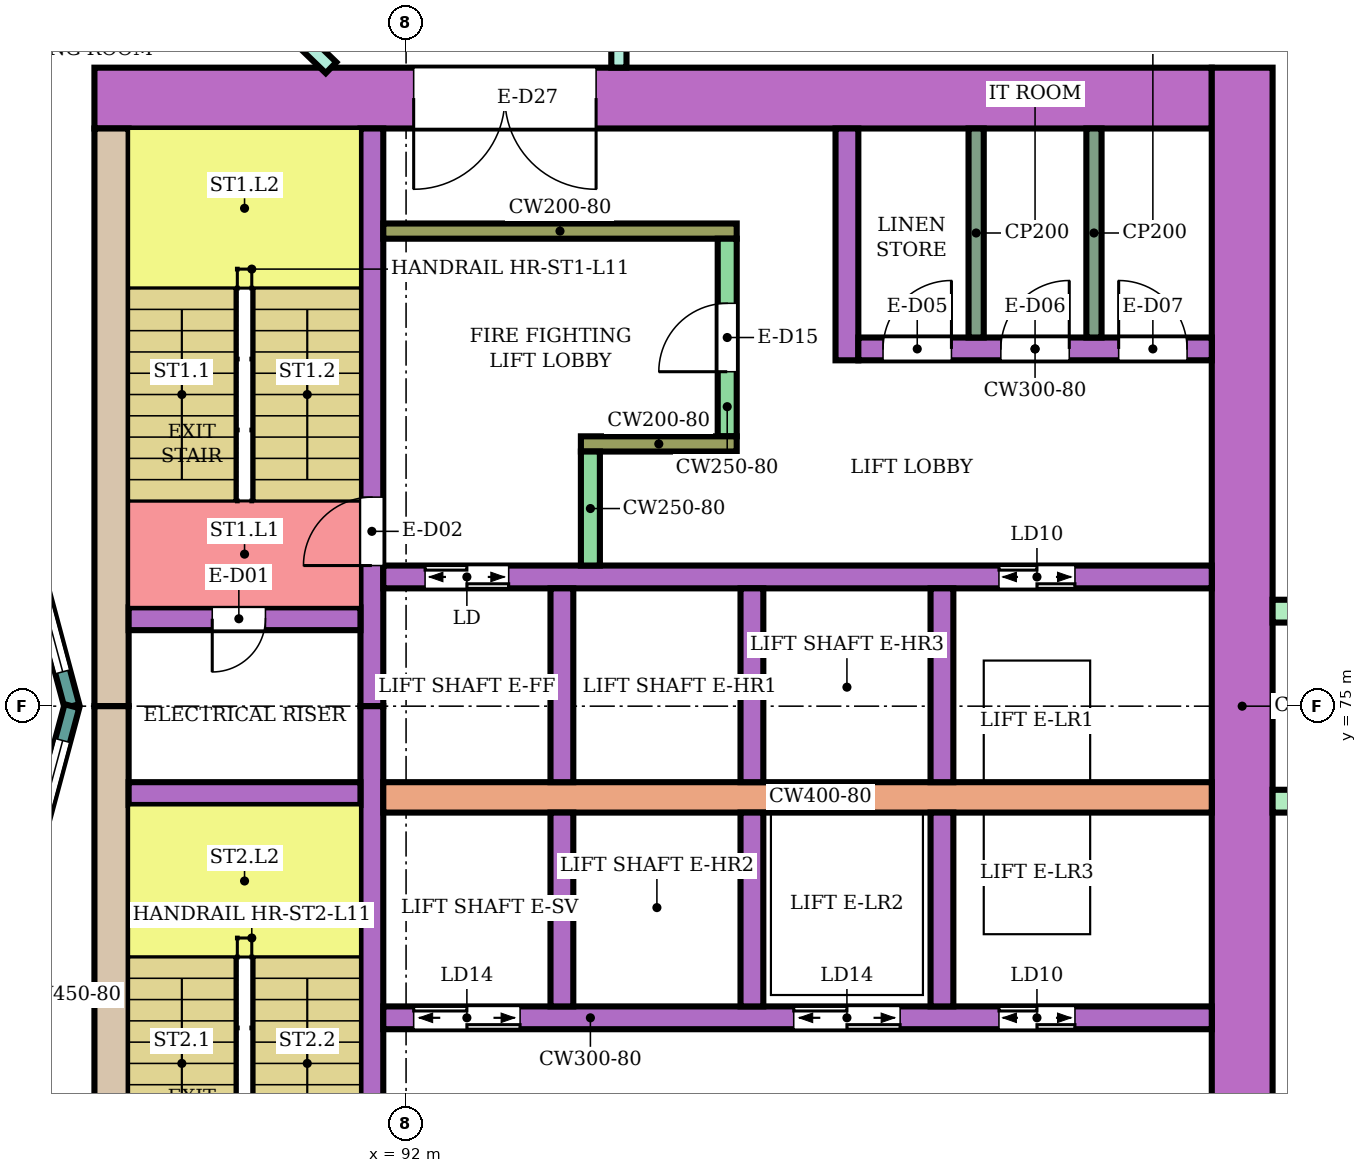
"""IFC4 building model, lengths in metres.
Left out: names, types, materials, properties, quantities, classifications, styles, units other than length and angle.
Written with IfcOpenShell. Run it as: python <this file> out.ifc"""

import sys

from ifc_helpers import new_model, si_unit, direction, frame, frame_2d, origin, place, context, subcontext, project, spatial, rectangle, extrude, element, fill, save


model = new_model("IFC4")
c1 = context("Model", 3, precision=1e-05, world=origin(), true_north=direction((0.0, 1.0)))
c2 = subcontext(c1, "Body", "Model", "MODEL_VIEW")
j1 = project(units=[si_unit("LENGTHUNIT", "METRE"), si_unit("PLANEANGLEUNIT", "RADIAN")], contexts=[c1])
p1 = place(None, origin())
s1 = spatial("IfcSite", under=j1, at=p1, CompositionType="ELEMENT")
p2 = place(p1, origin())
s2 = spatial("IfcBuilding", under=s1, at=p2, CompositionType="ELEMENT")
p3 = place(p2, frame((0.0, 0.0, 51.6)))
s3 = spatial("IfcBuildingStorey", under=s2, at=p3, CompositionType="ELEMENT", Elevation=51.6)
p4 = place(p3, frame((87.9, 83.0, 0.0), z_axis=(0.0, 0.0, 1.0), x_axis=(1.0, 0.0, 0.0)))
e1 = element("IfcWall", 1, at=p4, inside=s3, PredefinedType="SHEAR", context=c2, shape_type="SweptSolid", body=[
    extrude(rectangle(XDim=14.7, YDim=0.8, at=frame_2d((7.35, 0.0))), origin(), (0.0, 0.0, 1.0), 3.48),
])
p5 = place(p4, frame((4.2, 0.0, 0.0)))
e2 = element("IfcOpeningElement", 2, at=p5, cuts=e1, PredefinedType="OPENING", context=c2, shape_type="SweptSolid", body=[
    extrude(rectangle(XDim=2.4, YDim=2.4, at=frame_2d((1.2, 1.2))), frame((0.0, 0.41, 0.0), z_axis=(0.0, -1.0, 0.0), x_axis=(1.0, 0.0, 0.0)), (0.0, 0.0, 1.0), 0.82),
])
for number, where, z_axis, x_axis in (
    (3, (88.125, 75.0, 0.0), (0.0, 0.0, 1.0), (0.0, 1.0, 0.0)),
    (4, (88.125, 67.4, 0.0), (0.0, 0.0, 1.0), (0.0, 1.0, 0.0)),
):
    element("IfcWall", number, at=place(p3, frame(where, z_axis=z_axis, x_axis=x_axis)), inside=s3, PredefinedType="SHEAR", context=c2, shape_type="SweptSolid", body=[
        extrude(rectangle(XDim=7.6, YDim=0.45, at=frame_2d((3.8, 0.0))), origin(), (0.0, 0.0, 1.0), 3.48),
    ])
p6 = place(p3, frame((103.0, 66.6, 0.0), z_axis=(0.0, 0.0, 1.0), x_axis=(0.0, 1.0, 0.0)))
e5 = element("IfcWall", 5, at=p6, inside=s3, PredefinedType="SHEAR", context=c2, shape_type="SweptSolid", body=[
    extrude(rectangle(XDim=16.8, YDim=0.8, at=frame_2d((8.4, 0.0))), origin(), (0.0, 0.0, 1.0), 3.48),
])
p7 = place(p3, frame((91.55, 75.0, 0.0), z_axis=(0.0, 0.0, 1.0), x_axis=(0.0, 1.0, 0.0)))
e6 = element("IfcWall", 6, at=p7, inside=s3, PredefinedType="SHEAR", context=c2, shape_type="SweptSolid", body=[
    extrude(rectangle(XDim=7.6, YDim=0.3, at=frame_2d((3.8, 0.0))), origin(), (0.0, 0.0, 1.0), 3.48),
])
p8 = place(p7, frame((1.85, 0.0, 0.0)))
e7 = element("IfcOpeningElement", 7, at=p8, cuts=e6, PredefinedType="OPENING", context=c2, shape_type="SweptSolid", body=[
    extrude(rectangle(XDim=0.9, YDim=2.1, at=frame_2d((0.45, 1.05))), frame((0.0, 0.16, 0.0), z_axis=(0.0, -1.0, 0.0), x_axis=(1.0, 0.0, 0.0)), (0.0, 0.0, 1.0), 0.32),
])
p9 = place(p3, frame((91.55, 67.4, 0.0), z_axis=(0.0, 0.0, 1.0), x_axis=(0.0, 1.0, 0.0)))
e8 = element("IfcWall", 8, at=p9, inside=s3, PredefinedType="SHEAR", context=c2, shape_type="SweptSolid", body=[
    extrude(rectangle(XDim=7.6, YDim=0.3, at=frame_2d((3.8, 0.0))), origin(), (0.0, 0.0, 1.0), 3.48),
])
p10 = place(p9, frame((0.25, 0.0, 0.0)))
e9 = element("IfcOpeningElement", 9, at=p10, cuts=e8, PredefinedType="OPENING", context=c2, shape_type="SweptSolid", body=[
    extrude(rectangle(XDim=0.9, YDim=2.1, at=frame_2d((0.45, 1.05))), frame((0.0, 0.16, 0.0), z_axis=(0.0, -1.0, 0.0), x_axis=(1.0, 0.0, 0.0)), (0.0, 0.0, 1.0), 0.32),
])
p11 = place(p3, frame((88.35, 76.15, 0.0), z_axis=(0.0, 0.0, 1.0), x_axis=(1.0, 0.0, 0.0)))
e10 = element("IfcWall", 10, at=p11, inside=s3, PredefinedType="SHEAR", context=c2, shape_type="SweptSolid", body=[
    extrude(rectangle(XDim=3.05, YDim=0.3, at=frame_2d((1.525, 0.0))), origin(), (0.0, 0.0, 1.0), 3.48),
])
p12 = place(p11, frame((1.1, 0.0, 0.0)))
e11 = element("IfcOpeningElement", 11, at=p12, cuts=e10, PredefinedType="OPENING", context=c2, shape_type="SweptSolid", body=[
    extrude(rectangle(XDim=0.7, YDim=2.0, at=frame_2d((0.35, 1.0))), frame((0.0, 0.16, 0.0), z_axis=(0.0, -1.0, 0.0), x_axis=(1.0, 0.0, 0.0)), (0.0, 0.0, 1.0), 0.32),
])
p13 = place(p3, frame((88.35, 73.85, 0.0), z_axis=(0.0, 0.0, 1.0), x_axis=(1.0, 0.0, 0.0)))
e12 = element("IfcWall", 12, at=p13, inside=s3, PredefinedType="SHEAR", context=c2, shape_type="SweptSolid", body=[
    extrude(rectangle(XDim=3.05, YDim=0.3, at=frame_2d((1.525, 0.0))), origin(), (0.0, 0.0, 1.0), 3.48),
])
p14 = place(p3, frame((91.7, 76.7, 0.0), z_axis=(0.0, 0.0, 1.0), x_axis=(1.0, 0.0, 0.0)))
e13 = element("IfcWall", 13, at=p14, inside=s3, PredefinedType="SHEAR", context=c2, shape_type="SweptSolid", body=[
    extrude(rectangle(XDim=10.9, YDim=0.3, at=frame_2d((5.45, 0.0))), origin(), (0.0, 0.0, 1.0), 3.48),
])
p15 = place(p14, frame((0.55, 0.0, 0.0)))
e14 = element("IfcOpeningElement", 14, at=p15, cuts=e13, PredefinedType="OPENING", context=c2, shape_type="SweptSolid", body=[
    extrude(rectangle(XDim=1.1, YDim=2.1, at=frame_2d((0.55, 1.05))), frame((0.0, 0.16, 0.0), z_axis=(0.0, -1.0, 0.0), x_axis=(1.0, 0.0, 0.0)), (0.0, 0.0, 1.0), 0.32),
])
p16 = place(p14, frame((8.1, 0.0, 0.0)))
e15 = element("IfcOpeningElement", 15, at=p16, cuts=e13, PredefinedType="OPENING", context=c2, shape_type="SweptSolid", body=[
    extrude(rectangle(XDim=1.0, YDim=2.1, at=frame_2d((0.5, 1.05))), frame((0.0, 0.16, 0.0), z_axis=(0.0, -1.0, 0.0), x_axis=(1.0, 0.0, 0.0)), (0.0, 0.0, 1.0), 0.32),
])
p17 = place(p3, frame((91.7, 73.8, 0.0), z_axis=(0.0, 0.0, 1.0), x_axis=(1.0, 0.0, 0.0)))
e16 = element("IfcWall", 16, at=p17, inside=s3, PredefinedType="SHEAR", context=c2, shape_type="SweptSolid", body=[
    extrude(rectangle(XDim=10.9, YDim=0.4, at=frame_2d((5.45, 0.0))), origin(), (0.0, 0.0, 1.0), 3.48),
])
p18 = place(p3, frame((91.7, 70.9, 0.0), z_axis=(0.0, 0.0, 1.0), x_axis=(1.0, 0.0, 0.0)))
e17 = element("IfcWall", 17, at=p18, inside=s3, PredefinedType="SHEAR", context=c2, shape_type="SweptSolid", body=[
    extrude(rectangle(XDim=10.9, YDim=0.3, at=frame_2d((5.45, 0.0))), origin(), (0.0, 0.0, 1.0), 3.48),
])
p19 = place(p18, frame((0.4, 0.0, 0.0)))
e18 = element("IfcOpeningElement", 18, at=p19, cuts=e17, PredefinedType="OPENING", context=c2, shape_type="SweptSolid", body=[
    extrude(rectangle(XDim=1.4, YDim=2.1, at=frame_2d((0.7, 1.05))), frame((0.0, 0.16, 0.0), z_axis=(0.0, -1.0, 0.0), x_axis=(1.0, 0.0, 0.0)), (0.0, 0.0, 1.0), 0.32),
])
p20 = place(p18, frame((5.4, 0.0, 0.0)))
e19 = element("IfcOpeningElement", 19, at=p20, cuts=e17, PredefinedType="OPENING", context=c2, shape_type="SweptSolid", body=[
    extrude(rectangle(XDim=1.4, YDim=2.1, at=frame_2d((0.7, 1.05))), frame((0.0, 0.16, 0.0), z_axis=(0.0, -1.0, 0.0), x_axis=(1.0, 0.0, 0.0)), (0.0, 0.0, 1.0), 0.32),
])
p21 = place(p18, frame((8.1, 0.0, 0.0)))
e20 = element("IfcOpeningElement", 20, at=p21, cuts=e17, PredefinedType="OPENING", context=c2, shape_type="SweptSolid", body=[
    extrude(rectangle(XDim=1.0, YDim=2.1, at=frame_2d((0.5, 1.05))), frame((0.0, 0.16, 0.0), z_axis=(0.0, -1.0, 0.0), x_axis=(1.0, 0.0, 0.0)), (0.0, 0.0, 1.0), 0.32),
])
for number, where, z_axis, x_axis in (
    (21, (94.05, 74.0, 0.0), (0.0, 0.0, 1.0), (0.0, 1.0, 0.0)),
    (22, (96.55, 74.0, 0.0), (0.0, 0.0, 1.0), (0.0, 1.0, 0.0)),
    (23, (99.05, 74.0, 0.0), (0.0, 0.0, 1.0), (0.0, 1.0, 0.0)),
    (24, (94.05, 71.05, 0.0), (0.0, 0.0, 1.0), (0.0, 1.0, 0.0)),
    (25, (96.55, 71.05, 0.0), (0.0, 0.0, 1.0), (0.0, 1.0, 0.0)),
    (26, (99.05, 71.05, 0.0), (0.0, 0.0, 1.0), (0.0, 1.0, 0.0)),
):
    element("IfcWall", number, at=place(p3, frame(where, z_axis=z_axis, x_axis=x_axis)), inside=s3, PredefinedType="SHEAR", context=c2, shape_type="SweptSolid", body=[
        extrude(rectangle(XDim=2.55, YDim=0.3, at=frame_2d((1.275, 0.0))), origin(), (0.0, 0.0, 1.0), 3.48),
    ])
p22 = place(p3, frame((91.7, 81.25, 0.0), z_axis=(0.0, 0.0, 1.0), x_axis=(1.0, 0.0, 0.0)))
e27 = element("IfcWall", 27, at=p22, inside=s3, PredefinedType="SHEAR", context=c2, shape_type="SweptSolid", body=[
    extrude(rectangle(XDim=4.65, YDim=0.2, at=frame_2d((2.325, 0.0))), origin(), (0.0, 0.0, 1.0), 3.48),
])
p23 = place(p3, frame((96.225, 78.55, 0.0), z_axis=(0.0, 0.0, 1.0), x_axis=(0.0, 1.0, 0.0)))
e28 = element("IfcWall", 28, at=p23, inside=s3, PredefinedType="SHEAR", context=c2, shape_type="SweptSolid", body=[
    extrude(rectangle(XDim=2.6, YDim=0.25, at=frame_2d((1.3, 0.0))), origin(), (0.0, 0.0, 1.0), 3.48),
])
p24 = place(p23, frame((0.85, 0.0, 0.0)))
e29 = element("IfcOpeningElement", 29, at=p24, cuts=e28, PredefinedType="OPENING", context=c2, shape_type="SweptSolid", body=[
    extrude(rectangle(XDim=0.9, YDim=2.1, at=frame_2d((0.45, 1.05))), frame((0.0, 0.135, 0.0), z_axis=(0.0, -1.0, 0.0), x_axis=(1.0, 0.0, 0.0)), (0.0, 0.0, 1.0), 0.27),
])
p25 = place(p3, frame((94.3, 78.45, 0.0), z_axis=(0.0, 0.0, 1.0), x_axis=(1.0, 0.0, 0.0)))
e30 = element("IfcWall", 30, at=p25, inside=s3, PredefinedType="SHEAR", context=c2, shape_type="SweptSolid", body=[
    extrude(rectangle(XDim=2.05, YDim=0.2, at=frame_2d((1.025, 0.0))), origin(), (0.0, 0.0, 1.0), 3.48),
])
p26 = place(p3, frame((94.425, 76.85, 0.0), z_axis=(0.0, 0.0, 1.0), x_axis=(0.0, 1.0, 0.0)))
e31 = element("IfcWall", 31, at=p26, inside=s3, PredefinedType="SHEAR", context=c2, shape_type="SweptSolid", body=[
    extrude(rectangle(XDim=1.5, YDim=0.25, at=frame_2d((0.75, 0.0))), origin(), (0.0, 0.0, 1.0), 3.48),
])
p27 = place(p3, frame((97.8, 79.55, 0.0), z_axis=(0.0, 0.0, 1.0), x_axis=(0.0, 1.0, 0.0)))
e32 = element("IfcWall", 32, at=p27, inside=s3, PredefinedType="SHEAR", context=c2, shape_type="SweptSolid", body=[
    extrude(rectangle(XDim=3.05, YDim=0.3, at=frame_2d((1.525, 0.0))), origin(), (0.0, 0.0, 1.0), 3.48),
])
p28 = place(p3, frame((97.95, 79.7, 0.0), z_axis=(0.0, 0.0, 1.0), x_axis=(1.0, 0.0, 0.0)))
e33 = element("IfcWall", 33, at=p28, inside=s3, PredefinedType="SHEAR", context=c2, shape_type="SweptSolid", body=[
    extrude(rectangle(XDim=4.65, YDim=0.3, at=frame_2d((2.325, 0.0))), origin(), (0.0, 0.0, 1.0), 3.48),
])
p29 = place(p28, frame((0.325, 0.0, 0.0)))
e34 = element("IfcOpeningElement", 34, at=p29, cuts=e33, PredefinedType="OPENING", context=c2, shape_type="SweptSolid", body=[
    extrude(rectangle(XDim=0.9, YDim=2.1, at=frame_2d((0.45, 1.05))), frame((0.0, 0.16, 0.0), z_axis=(0.0, -1.0, 0.0), x_axis=(1.0, 0.0, 0.0)), (0.0, 0.0, 1.0), 0.32),
])
p30 = place(p28, frame((1.875, 0.0, 0.0)))
e35 = element("IfcOpeningElement", 35, at=p30, cuts=e33, PredefinedType="OPENING", context=c2, shape_type="SweptSolid", body=[
    extrude(rectangle(XDim=0.9, YDim=2.1, at=frame_2d((0.45, 1.05))), frame((0.0, 0.16, 0.0), z_axis=(0.0, -1.0, 0.0), x_axis=(1.0, 0.0, 0.0)), (0.0, 0.0, 1.0), 0.32),
])
p31 = place(p28, frame((3.425, 0.0, 0.0)))
e36 = element("IfcOpeningElement", 36, at=p31, cuts=e33, PredefinedType="OPENING", context=c2, shape_type="SweptSolid", body=[
    extrude(rectangle(XDim=0.9, YDim=2.1, at=frame_2d((0.45, 1.05))), frame((0.0, 0.16, 0.0), z_axis=(0.0, -1.0, 0.0), x_axis=(1.0, 0.0, 0.0)), (0.0, 0.0, 1.0), 0.32),
])
for number, where, z_axis, x_axis in (
    (37, (103.4, 73.75, 0.0), (0.0, 0.0, 1.0), (1.0, 0.0, 0.0)),
    (38, (103.4, 76.25, 0.0), (0.0, 0.0, 1.0), (1.0, 0.0, 0.0)),
):
    element("IfcWall", number, at=place(p3, frame(where, z_axis=z_axis, x_axis=x_axis)), inside=s3, PredefinedType="NOTDEFINED", context=c2, shape_type="SweptSolid", body=[
        extrude(rectangle(XDim=2.416, YDim=0.3, at=frame_2d((1.208, 0.0))), origin(), (0.0, 0.0, 1.0), 3.8),
    ])
p32 = place(p3, frame((87.604, 75.0, 0.0), z_axis=(0.0, 0.0, 1.0), x_axis=(-0.258789828301, 0.965933654434, 0.0)))
e39 = element("IfcWall", 39, at=p32, inside=s3, PredefinedType="NOTDEFINED", context=c2, shape_type="SweptSolid", body=[
    extrude(rectangle(XDim=3.936, YDim=0.2, at=frame_2d((1.968, 0.0))), origin(), (0.0, 0.0, 1.0), 3.8),
])
p33 = place(p32, frame((0.468, 0.0, 0.9)))
e40 = element("IfcOpeningElement", 40, at=p33, cuts=e39, PredefinedType="OPENING", context=c2, shape_type="SweptSolid", body=[
    extrude(rectangle(XDim=3.0, YDim=2.3, at=frame_2d((1.5, 1.15))), frame((0.0, 0.11, 0.0), z_axis=(0.0, -1.0, 0.0), x_axis=(1.0, 0.0, 0.0)), (0.0, 0.0, 1.0), 0.22),
])
p34 = place(p3, frame((86.585, 71.198, 0.0), z_axis=(0.0, 0.0, 1.0), x_axis=(0.258789828301, 0.965933654434, 0.0)))
e41 = element("IfcWall", 41, at=p34, inside=s3, PredefinedType="NOTDEFINED", context=c2, shape_type="SweptSolid", body=[
    extrude(rectangle(XDim=3.936, YDim=0.2, at=frame_2d((1.968, 0.0))), origin(), (0.0, 0.0, 1.0), 3.8),
])
p35 = place(p34, frame((0.468, 0.0, 0.9)))
e42 = element("IfcOpeningElement", 42, at=p35, cuts=e41, PredefinedType="OPENING", context=c2, shape_type="SweptSolid", body=[
    extrude(rectangle(XDim=3.0, YDim=2.3, at=frame_2d((1.5, 1.15))), frame((0.0, 0.11, 0.0), z_axis=(0.0, -1.0, 0.0), x_axis=(1.0, 0.0, 0.0)), (0.0, 0.0, 1.0), 0.22),
])
p36 = place(p3, frame((87.064, 87.211, 0.0), z_axis=(0.0, 0.0, 1.0), x_axis=(0.719562412484, -0.694427774891, 0.0)))
e43 = element("IfcWall", 43, at=p36, inside=s3, PredefinedType="PARTITIONING", context=c2, shape_type="SweptSolid", body=[
    extrude(rectangle(XDim=5.488, YDim=0.2, at=frame_2d((2.744, 0.0))), origin(), (0.0, 0.0, 1.0), 3.35),
])
p37 = place(p36, frame((2.294, 0.0, 0.0)))
e44 = element("IfcOpeningElement", 44, at=p37, cuts=e43, PredefinedType="OPENING", context=c2, shape_type="SweptSolid", body=[
    extrude(rectangle(XDim=0.9, YDim=2.1, at=frame_2d((0.45, 1.05))), frame((0.0, 0.11, 0.0), z_axis=(0.0, -1.0, 0.0), x_axis=(1.0, 0.0, 0.0)), (0.0, 0.0, 1.0), 0.22),
])
p38 = place(p3, frame((94.8, 83.401, 0.0), z_axis=(0.0, 0.0, 1.0), x_axis=(0.0, 1.0, 0.0)))
e45 = element("IfcWall", 45, at=p38, inside=s3, PredefinedType="PARTITIONING", context=c2, shape_type="SweptSolid", body=[
    extrude(rectangle(XDim=1.499, YDim=0.2, at=frame_2d((0.75, 0.0))), origin(), (0.0, 0.0, 1.0), 3.35),
])
for number, where, z_axis, x_axis in (
    (46, (99.5, 79.85, 0.0), (0.0, 0.0, 1.0), (0.0, 1.0, 0.0)),
    (47, (101.05, 79.85, 0.0), (0.0, 0.0, 1.0), (0.0, 1.0, 0.0)),
):
    element("IfcWall", number, at=place(p3, frame(where, z_axis=z_axis, x_axis=x_axis)), inside=s3, PredefinedType="PARTITIONING", context=c2, shape_type="SweptSolid", body=[
        extrude(rectangle(XDim=2.75, YDim=0.2, at=frame_2d((1.375, 0.0))), origin(), (0.0, 0.0, 1.0), 3.48),
    ])
p39 = place(p33, origin())
e48 = element("IfcWindow", 48, at=p39, inside=s3, PartitioningType="SINGLE_PANEL", PredefinedType="WINDOW", context=c2, shape_type="SweptSolid", body=[
    extrude(rectangle(XDim=3.0, YDim=2.3, at=frame_2d((1.5, 1.15))), frame((0.0, 0.03, 0.0), z_axis=(0.0, -1.0, 0.0), x_axis=(1.0, 0.0, 0.0)), (0.0, 0.0, 1.0), 0.06),
])
fill(e40, e48)
p40 = place(p35, origin())
e49 = element("IfcWindow", 49, at=p40, inside=s3, PartitioningType="SINGLE_PANEL", PredefinedType="WINDOW", context=c2, shape_type="SweptSolid", body=[
    extrude(rectangle(XDim=3.0, YDim=2.3, at=frame_2d((1.5, 1.15))), frame((0.0, 0.03, 0.0), z_axis=(0.0, -1.0, 0.0), x_axis=(1.0, 0.0, 0.0)), (0.0, 0.0, 1.0), 0.06),
])
fill(e42, e49)
p41 = place(p12, frame((0.7, 0.0, 0.0), z_axis=(0.0, 0.0, 1.0), x_axis=(-1.0, 0.0, 0.0)))
e50 = element("IfcDoor", 50, at=p41, inside=s3, OperationType="SINGLE_SWING_RIGHT", PredefinedType="DOOR", context=c2, shape_type="SweptSolid", body=[
    extrude(rectangle(XDim=0.7, YDim=2.0, at=frame_2d((0.35, 1.0))), frame((0.0, 0.025, 0.0), z_axis=(0.0, -1.0, 0.0), x_axis=(1.0, 0.0, 0.0)), (0.0, 0.0, 1.0), 0.05),
])
fill(e11, e50)
p42 = place(p8, origin())
e51 = element("IfcDoor", 51, at=p42, inside=s3, OperationType="SINGLE_SWING_LEFT", PredefinedType="DOOR", context=c2, shape_type="SweptSolid", body=[
    extrude(rectangle(XDim=0.9, YDim=2.1, at=frame_2d((0.45, 1.05))), frame((0.0, 0.025, 0.0), z_axis=(0.0, -1.0, 0.0), x_axis=(1.0, 0.0, 0.0)), (0.0, 0.0, 1.0), 0.05),
])
fill(e7, e51)
p43 = place(p15, origin())
e52 = element("IfcDoor", 52, at=p43, inside=s3, OperationType="DOUBLE_DOOR_SLIDING", PredefinedType="DOOR", context=c2, shape_type="SweptSolid", body=[
    extrude(rectangle(XDim=1.1, YDim=2.1, at=frame_2d((0.55, 1.05))), frame((0.0, 0.025, 0.0), z_axis=(0.0, -1.0, 0.0), x_axis=(1.0, 0.0, 0.0)), (0.0, 0.0, 1.0), 0.05),
])
fill(e14, e52)
p44 = place(p16, origin())
e53 = element("IfcDoor", 53, at=p44, inside=s3, OperationType="DOUBLE_DOOR_SLIDING", PredefinedType="DOOR", context=c2, shape_type="SweptSolid", body=[
    extrude(rectangle(XDim=1.0, YDim=2.1, at=frame_2d((0.5, 1.05))), frame((0.0, 0.025, 0.0), z_axis=(0.0, -1.0, 0.0), x_axis=(1.0, 0.0, 0.0)), (0.0, 0.0, 1.0), 0.05),
])
fill(e15, e53)
p45 = place(p19, origin())
e54 = element("IfcDoor", 54, at=p45, inside=s3, OperationType="DOUBLE_DOOR_SLIDING", PredefinedType="DOOR", context=c2, shape_type="SweptSolid", body=[
    extrude(rectangle(XDim=1.4, YDim=2.1, at=frame_2d((0.7, 1.05))), frame((0.0, 0.025, 0.0), z_axis=(0.0, -1.0, 0.0), x_axis=(1.0, 0.0, 0.0)), (0.0, 0.0, 1.0), 0.05),
])
fill(e18, e54)
p46 = place(p20, origin())
e55 = element("IfcDoor", 55, at=p46, inside=s3, OperationType="DOUBLE_DOOR_SLIDING", PredefinedType="DOOR", context=c2, shape_type="SweptSolid", body=[
    extrude(rectangle(XDim=1.4, YDim=2.1, at=frame_2d((0.7, 1.05))), frame((0.0, 0.025, 0.0), z_axis=(0.0, -1.0, 0.0), x_axis=(1.0, 0.0, 0.0)), (0.0, 0.0, 1.0), 0.05),
])
fill(e19, e55)
p47 = place(p21, origin())
e56 = element("IfcDoor", 56, at=p47, inside=s3, OperationType="DOUBLE_DOOR_SLIDING", PredefinedType="DOOR", context=c2, shape_type="SweptSolid", body=[
    extrude(rectangle(XDim=1.0, YDim=2.1, at=frame_2d((0.5, 1.05))), frame((0.0, 0.025, 0.0), z_axis=(0.0, -1.0, 0.0), x_axis=(1.0, 0.0, 0.0)), (0.0, 0.0, 1.0), 0.05),
])
fill(e20, e56)
p48 = place(p24, origin())
e57 = element("IfcDoor", 57, at=p48, inside=s3, OperationType="SINGLE_SWING_LEFT", PredefinedType="DOOR", context=c2, shape_type="SweptSolid", body=[
    extrude(rectangle(XDim=0.9, YDim=2.1, at=frame_2d((0.45, 1.05))), frame((0.0, 0.025, 0.0), z_axis=(0.0, -1.0, 0.0), x_axis=(1.0, 0.0, 0.0)), (0.0, 0.0, 1.0), 0.05),
])
fill(e29, e57)
p49 = place(p29, origin())
e58 = element("IfcDoor", 58, at=p49, inside=s3, OperationType="SINGLE_SWING_RIGHT", PredefinedType="DOOR", context=c2, shape_type="SweptSolid", body=[
    extrude(rectangle(XDim=0.9, YDim=2.1, at=frame_2d((0.45, 1.05))), frame((0.0, 0.025, 0.0), z_axis=(0.0, -1.0, 0.0), x_axis=(1.0, 0.0, 0.0)), (0.0, 0.0, 1.0), 0.05),
])
fill(e34, e58)
p50 = place(p30, origin())
e59 = element("IfcDoor", 59, at=p50, inside=s3, OperationType="SINGLE_SWING_RIGHT", PredefinedType="DOOR", context=c2, shape_type="SweptSolid", body=[
    extrude(rectangle(XDim=0.9, YDim=2.1, at=frame_2d((0.45, 1.05))), frame((0.0, 0.025, 0.0), z_axis=(0.0, -1.0, 0.0), x_axis=(1.0, 0.0, 0.0)), (0.0, 0.0, 1.0), 0.05),
])
fill(e35, e59)
p51 = place(p31, origin())
e60 = element("IfcDoor", 60, at=p51, inside=s3, OperationType="SINGLE_SWING_LEFT", PredefinedType="DOOR", context=c2, shape_type="SweptSolid", body=[
    extrude(rectangle(XDim=0.9, YDim=2.1, at=frame_2d((0.45, 1.05))), frame((0.0, 0.025, 0.0), z_axis=(0.0, -1.0, 0.0), x_axis=(1.0, 0.0, 0.0)), (0.0, 0.0, 1.0), 0.05),
])
fill(e36, e60)
p52 = place(p5, frame((2.4, 0.0, 0.0), z_axis=(0.0, 0.0, 1.0), x_axis=(-1.0, 0.0, 0.0)))
e61 = element("IfcDoor", 61, at=p52, inside=s3, OperationType="DOUBLE_DOOR_SINGLE_SWING", PredefinedType="DOOR", context=c2, shape_type="SweptSolid", body=[
    extrude(rectangle(XDim=2.4, YDim=2.4, at=frame_2d((1.2, 1.2))), frame((0.0, 0.025, 0.0), z_axis=(0.0, -1.0, 0.0), x_axis=(1.0, 0.0, 0.0)), (0.0, 0.0, 1.0), 0.05),
])
fill(e2, e61)
save(model, sys.argv[1])
